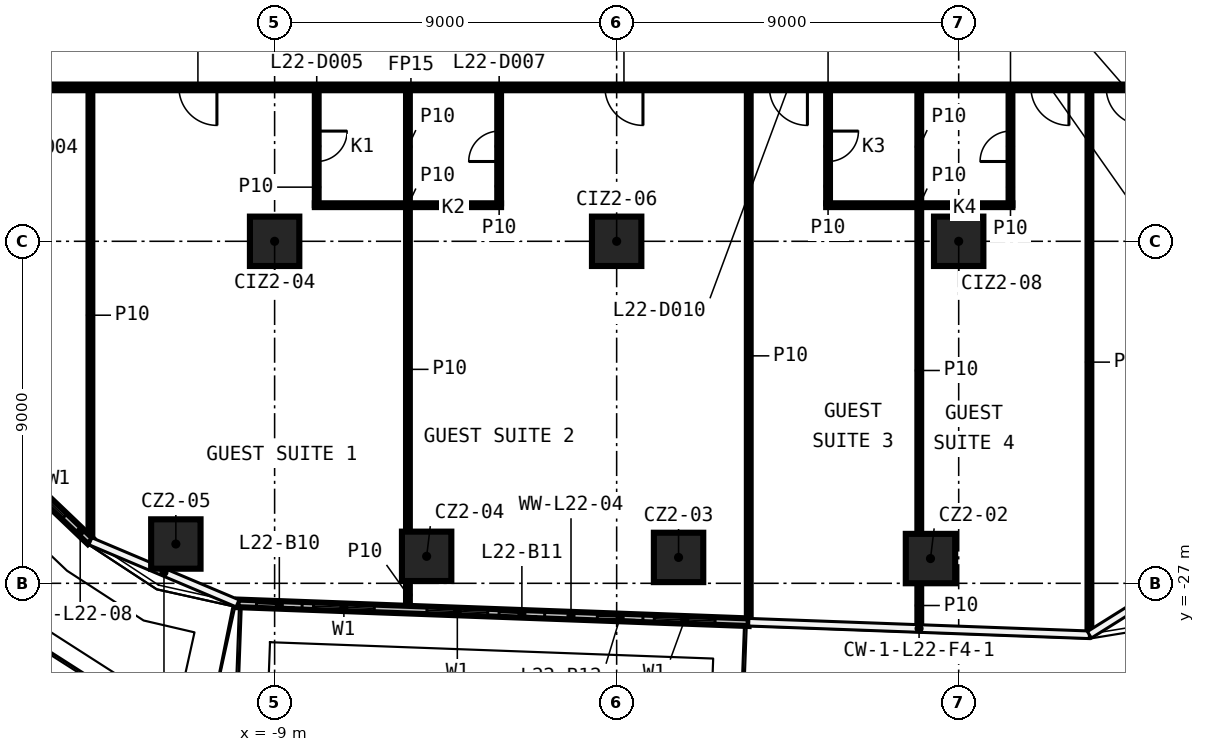
"""IFC4 building model, lengths in metres.
Left out: names, types, materials, properties, quantities, classifications, styles, units other than length and angle.
Written with IfcOpenShell. Run it as: python <this file> out.ifc"""

import sys

from ifc_helpers import new_model, si_unit, direction, frame, frame_2d, origin, origin_2d, place, context, subcontext, project, spatial, rectangle, extrude, element, fill, save


model = new_model("IFC4")
c1 = context("Model", 3, precision=1e-05, world=origin(), true_north=direction((0.0, 1.0)))
c2 = subcontext(c1, "Body", "Model", "MODEL_VIEW")
j1 = project(units=[si_unit("LENGTHUNIT", "METRE"), si_unit("PLANEANGLEUNIT", "RADIAN")], contexts=[c1])
p1 = place(None, origin())
s1 = spatial("IfcSite", under=j1, at=p1, CompositionType="ELEMENT")
p2 = place(p1, origin())
s2 = spatial("IfcBuilding", under=s1, at=p2, CompositionType="ELEMENT")
p3 = place(p2, frame((0.0, 0.0, 106.3)))
s3 = spatial("IfcBuildingStorey", under=s2, at=p3, CompositionType="ELEMENT", Elevation=106.3)
for number, where, z_axis, x_axis in (
    (1, (8.258, -26.349, 0.0), (0.0, 0.0, 1.0), (1.0, 0.0, 0.0)),
    (2, (1.629, -26.319, 0.0), (0.0, 0.0, 1.0), (1.0, 0.0, 0.0)),
    (3, (-5.0, -26.29, 0.0), (0.0, 0.0, 1.0), (1.0, 0.0, 0.0)),
    (4, (-11.599, -25.966, 0.0), (0.0, 0.0, 1.0), (1.0, 0.0, 0.0)),
    (5, (-9.0, -18.0, 0.0), (0.0, 0.0, 1.0), (1.0, 0.0, 0.0)),
    (6, (0.0, -18.0, 0.0), (0.0, 0.0, 1.0), (1.0, 0.0, 0.0)),
    (7, (9.0, -18.0, 0.0), (0.0, 0.0, 1.0), (1.0, 0.0, 0.0)),
):
    element("IfcColumn", number, at=place(p3, frame(where, z_axis=z_axis, x_axis=x_axis)), inside=s3, PredefinedType="COLUMN", context=c2, shape_type="SweptSolid", body=[
        extrude(rectangle(XDim=1.3, YDim=1.3, at=origin_2d()), origin(), (0.0, 0.0, 1.0), 3.3),
    ])
p4 = place(p3, frame((-7.942, -17.05, 0.0), z_axis=(0.0, 0.0, 1.0), x_axis=(1.0, 0.0, 0.0)))
e8 = element("IfcWall", 8, at=p4, inside=s3, PredefinedType="PARTITIONING", context=c2, shape_type="SweptSolid", body=[
    extrude(rectangle(XDim=4.9, YDim=0.1, at=frame_2d((2.45, 0.0))), origin(), (0.0, 0.0, 1.0), 3.3),
])
p5 = place(p3, frame((5.513, -17.05, 0.0), z_axis=(0.0, 0.0, 1.0), x_axis=(1.0, 0.0, 0.0)))
e9 = element("IfcWall", 9, at=p5, inside=s3, PredefinedType="PARTITIONING", context=c2, shape_type="SweptSolid", body=[
    extrude(rectangle(XDim=4.9, YDim=0.1, at=frame_2d((2.45, 0.0))), origin(), (0.0, 0.0, 1.0), 3.3),
])
p6 = place(p3, frame((17.025, -13.95, 0.0), z_axis=(0.0, 0.0, 1.0), x_axis=(-1.0, 0.0, 0.0)))
e10 = element("IfcWall", 10, at=p6, inside=s3, PredefinedType="PARTITIONING", context=c2, shape_type="SweptSolid", body=[
    extrude(rectangle(XDim=34.05, YDim=0.15, at=frame_2d((17.025, 0.0))), origin(), (0.0, 0.0, 1.0), 3.3),
])
p7 = place(p6, frame((31.974, 0.0, 0.0)))
e11 = element("IfcOpeningElement", 11, at=p7, cuts=e10, PredefinedType="OPENING", context=c2, shape_type="SweptSolid", body=[
    extrude(rectangle(XDim=0.9, YDim=2.1, at=frame_2d((0.45, 1.05))), frame((0.0, 0.085, 0.0), z_axis=(0.0, -1.0, 0.0), x_axis=(1.0, 0.0, 0.0)), (0.0, 0.0, 1.0), 0.17),
])
p8 = place(p6, frame((27.543, 0.0, 0.0)))
e12 = element("IfcOpeningElement", 12, at=p8, cuts=e10, PredefinedType="OPENING", context=c2, shape_type="SweptSolid", body=[
    extrude(rectangle(XDim=1.0, YDim=2.1, at=frame_2d((0.5, 1.05))), frame((0.0, 0.085, 0.0), z_axis=(0.0, -1.0, 0.0), x_axis=(1.0, 0.0, 0.0)), (0.0, 0.0, 1.0), 0.17),
])
p9 = place(p6, frame((16.333, 0.0, 0.0)))
e13 = element("IfcOpeningElement", 13, at=p9, cuts=e10, PredefinedType="OPENING", context=c2, shape_type="SweptSolid", body=[
    extrude(rectangle(XDim=1.0, YDim=2.1, at=frame_2d((0.5, 1.05))), frame((0.0, 0.085, 0.0), z_axis=(0.0, -1.0, 0.0), x_axis=(1.0, 0.0, 0.0)), (0.0, 0.0, 1.0), 0.17),
])
p10 = place(p6, frame((12.006, 0.0, 0.0)))
e14 = element("IfcOpeningElement", 14, at=p10, cuts=e10, PredefinedType="OPENING", context=c2, shape_type="SweptSolid", body=[
    extrude(rectangle(XDim=1.0, YDim=2.1, at=frame_2d((0.5, 1.05))), frame((0.0, 0.085, 0.0), z_axis=(0.0, -1.0, 0.0), x_axis=(1.0, 0.0, 0.0)), (0.0, 0.0, 1.0), 0.17),
])
p11 = place(p6, frame((5.124, 0.0, 0.0)))
e15 = element("IfcOpeningElement", 15, at=p11, cuts=e10, PredefinedType="OPENING", context=c2, shape_type="SweptSolid", body=[
    extrude(rectangle(XDim=1.0, YDim=2.1, at=frame_2d((0.5, 1.05))), frame((0.0, 0.085, 0.0), z_axis=(0.0, -1.0, 0.0), x_axis=(1.0, 0.0, 0.0)), (0.0, 0.0, 1.0), 0.17),
])
p12 = place(p6, frame((3.144, 0.0, 0.0)))
e16 = element("IfcOpeningElement", 16, at=p12, cuts=e10, PredefinedType="OPENING", context=c2, shape_type="SweptSolid", body=[
    extrude(rectangle(XDim=1.0, YDim=2.1, at=frame_2d((0.5, 1.05))), frame((0.0, 0.085, 0.0), z_axis=(0.0, -1.0, 0.0), x_axis=(1.0, 0.0, 0.0)), (0.0, 0.0, 1.0), 0.17),
])
p13 = place(p3, frame((12.44, -28.334, 0.0), z_axis=(0.0, 0.0, 1.0), x_axis=(0.0, 1.0, 0.0)))
e17 = element("IfcWall", 17, at=p13, inside=s3, PredefinedType="PARTITIONING", context=c2, shape_type="SweptSolid", body=[
    extrude(rectangle(XDim=14.31, YDim=0.1, at=frame_2d((7.155, 0.0))), origin(), (0.0, 0.0, 1.0), 3.3),
])
p14 = place(p3, frame((10.363, -17.05, 0.0), z_axis=(0.0, 0.0, 1.0), x_axis=(0.0, 1.0, 0.0)))
e18 = element("IfcWall", 18, at=p14, inside=s3, PredefinedType="PARTITIONING", context=c2, shape_type="SweptSolid", body=[
    extrude(rectangle(XDim=3.025, YDim=0.1, at=frame_2d((1.513, 0.0))), origin(), (0.0, 0.0, 1.0), 3.3),
])
p15 = place(p14, frame((1.15, 0.0, 0.0)))
e19 = element("IfcOpeningElement", 19, at=p15, cuts=e18, PredefinedType="OPENING", context=c2, shape_type="SweptSolid", body=[
    extrude(rectangle(XDim=0.8, YDim=2.1, at=frame_2d((0.4, 1.05))), frame((0.0, 0.06, 0.0), z_axis=(0.0, -1.0, 0.0), x_axis=(1.0, 0.0, 0.0)), (0.0, 0.0, 1.0), 0.12),
])
p16 = place(p3, frame((7.963, -28.17, 0.0), z_axis=(0.0, 0.0, 1.0), x_axis=(0.0, 1.0, 0.0)))
e20 = element("IfcWall", 20, at=p16, inside=s3, PredefinedType="PARTITIONING", context=c2, shape_type="SweptSolid", body=[
    extrude(rectangle(XDim=1.171, YDim=0.1, at=frame_2d((0.585, 0.0))), origin(), (0.0, 0.0, 1.0), 3.3),
])
p17 = place(p3, frame((7.963, -25.699, 0.0), z_axis=(0.0, 0.0, 1.0), x_axis=(0.0, 1.0, 0.0)))
e21 = element("IfcWall", 21, at=p17, inside=s3, PredefinedType="PARTITIONING", context=c2, shape_type="SweptSolid", body=[
    extrude(rectangle(XDim=8.599, YDim=0.1, at=frame_2d((4.299, 0.0))), origin(), (0.0, 0.0, 1.0), 3.3),
])
p18 = place(p3, frame((7.963, -17.0, 0.0), z_axis=(0.0, 0.0, 1.0), x_axis=(0.0, 1.0, 0.0)))
e22 = element("IfcWall", 22, at=p18, inside=s3, PredefinedType="PARTITIONING", context=c2, shape_type="SweptSolid", body=[
    extrude(rectangle(XDim=2.975, YDim=0.1, at=frame_2d((1.488, 0.0))), origin(), (0.0, 0.0, 1.0), 3.3),
])
p19 = place(p3, frame((5.563, -14.025, 0.0), z_axis=(0.0, 0.0, 1.0), x_axis=(0.0, -1.0, 0.0)))
e23 = element("IfcWall", 23, at=p19, inside=s3, PredefinedType="PARTITIONING", context=c2, shape_type="SweptSolid", body=[
    extrude(rectangle(XDim=2.975, YDim=0.1, at=frame_2d((1.488, 0.0))), origin(), (0.0, 0.0, 1.0), 3.3),
])
p20 = place(p19, frame((1.075, 0.0, 0.0)))
e24 = element("IfcOpeningElement", 24, at=p20, cuts=e23, PredefinedType="OPENING", context=c2, shape_type="SweptSolid", body=[
    extrude(rectangle(XDim=0.8, YDim=2.1, at=frame_2d((0.4, 1.05))), frame((0.0, 0.06, 0.0), z_axis=(0.0, -1.0, 0.0), x_axis=(1.0, 0.0, 0.0)), (0.0, 0.0, 1.0), 0.12),
])
p21 = place(p3, frame((3.476, -28.004, 0.0), z_axis=(0.0, 0.0, 1.0), x_axis=(0.0, 1.0, 0.0)))
e25 = element("IfcWall", 25, at=p21, inside=s3, PredefinedType="PARTITIONING", context=c2, shape_type="SweptSolid", body=[
    extrude(rectangle(XDim=13.979, YDim=0.1, at=frame_2d((6.99, 0.0))), origin(), (0.0, 0.0, 1.0), 3.3),
])
p22 = place(p3, frame((-3.092, -17.0, 0.0), z_axis=(0.0, 0.0, 1.0), x_axis=(0.0, 1.0, 0.0)))
e26 = element("IfcWall", 26, at=p22, inside=s3, PredefinedType="PARTITIONING", context=c2, shape_type="SweptSolid", body=[
    extrude(rectangle(XDim=2.975, YDim=0.1, at=frame_2d((1.488, 0.0))), origin(), (0.0, 0.0, 1.0), 3.3),
])
p23 = place(p22, frame((1.1, 0.0, 0.0)))
e27 = element("IfcOpeningElement", 27, at=p23, cuts=e26, PredefinedType="OPENING", context=c2, shape_type="SweptSolid", body=[
    extrude(rectangle(XDim=0.8, YDim=2.1, at=frame_2d((0.4, 1.05))), frame((0.0, 0.06, 0.0), z_axis=(0.0, -1.0, 0.0), x_axis=(1.0, 0.0, 0.0)), (0.0, 0.0, 1.0), 0.12),
])
p24 = place(p3, frame((-5.492, -27.673, 0.0), z_axis=(0.0, 0.0, 1.0), x_axis=(0.0, 1.0, 0.0)))
e28 = element("IfcWall", 28, at=p24, inside=s3, PredefinedType="PARTITIONING", context=c2, shape_type="SweptSolid", body=[
    extrude(rectangle(XDim=0.733, YDim=0.1, at=frame_2d((0.367, 0.0))), origin(), (0.0, 0.0, 1.0), 3.3),
])
p25 = place(p3, frame((-5.492, -25.64, 0.0), z_axis=(0.0, 0.0, 1.0), x_axis=(0.0, 1.0, 0.0)))
e29 = element("IfcWall", 29, at=p25, inside=s3, PredefinedType="PARTITIONING", context=c2, shape_type="SweptSolid", body=[
    extrude(rectangle(XDim=8.54, YDim=0.1, at=frame_2d((4.27, 0.0))), origin(), (0.0, 0.0, 1.0), 3.3),
])
p26 = place(p3, frame((-5.492, -17.0, 0.0), z_axis=(0.0, 0.0, 1.0), x_axis=(0.0, 1.0, 0.0)))
e30 = element("IfcWall", 30, at=p26, inside=s3, PredefinedType="PARTITIONING", context=c2, shape_type="SweptSolid", body=[
    extrude(rectangle(XDim=2.975, YDim=0.1, at=frame_2d((1.488, 0.0))), origin(), (0.0, 0.0, 1.0), 3.3),
])
p27 = place(p3, frame((-7.892, -14.025, 0.0), z_axis=(0.0, 0.0, 1.0), x_axis=(0.0, -1.0, 0.0)))
e31 = element("IfcWall", 31, at=p27, inside=s3, PredefinedType="PARTITIONING", context=c2, shape_type="SweptSolid", body=[
    extrude(rectangle(XDim=3.025, YDim=0.1, at=frame_2d((1.513, 0.0))), origin(), (0.0, 0.0, 1.0), 3.3),
])
p28 = place(p27, frame((1.075, 0.0, 0.0)))
e32 = element("IfcOpeningElement", 32, at=p28, cuts=e31, PredefinedType="OPENING", context=c2, shape_type="SweptSolid", body=[
    extrude(rectangle(XDim=0.8, YDim=2.1, at=frame_2d((0.4, 1.05))), frame((0.0, 0.06, 0.0), z_axis=(0.0, -1.0, 0.0), x_axis=(1.0, 0.0, 0.0)), (0.0, 0.0, 1.0), 0.12),
])
p29 = place(p3, frame((-13.847, -25.865, 0.0), z_axis=(0.0, 0.0, 1.0), x_axis=(0.0, 1.0, 0.0)))
e33 = element("IfcWall", 33, at=p29, inside=s3, PredefinedType="PARTITIONING", context=c2, shape_type="SweptSolid", body=[
    extrude(rectangle(XDim=11.84, YDim=0.1, at=frame_2d((5.92, 0.0))), origin(), (0.0, 0.0, 1.0), 3.3),
])
p30 = place(p3, frame((-17.133, -22.756, 0.0), z_axis=(0.0, 0.0, 1.0), x_axis=(0.723361644964, -0.69046935529, 0.0)))
e34 = element("IfcWall", 34, at=p30, inside=s3, PredefinedType="SOLIDWALL", context=c2, shape_type="SweptSolid", body=[
    extrude(rectangle(XDim=4.542, YDim=0.2, at=frame_2d((2.271, 0.0))), origin(), (0.0, 0.0, 1.0), 3.3),
])
p31 = place(p30, frame((2.0, 0.0, 0.6)))
e35 = element("IfcOpeningElement", 35, at=p31, cuts=e34, PredefinedType="OPENING", context=c2, shape_type="SweptSolid", body=[
    extrude(rectangle(XDim=1.6, YDim=2.4, at=frame_2d((0.8, 1.2))), frame((0.0, 0.11, 0.0), z_axis=(0.0, -1.0, 0.0), x_axis=(1.0, 0.0, 0.0)), (0.0, 0.0, 1.0), 0.22),
])
p32 = place(p30, frame((0.5, 0.0, 0.0)))
e36 = element("IfcOpeningElement", 36, at=p32, cuts=e34, PredefinedType="OPENING", context=c2, shape_type="SweptSolid", body=[
    extrude(rectangle(XDim=1.2, YDim=2.4, at=frame_2d((0.6, 1.2))), frame((0.0, 0.11, 0.0), z_axis=(0.0, -1.0, 0.0), x_axis=(1.0, 0.0, 0.0)), (0.0, 0.0, 1.0), 0.22),
])
p33 = place(p3, frame((-9.975, -27.528, 0.0), z_axis=(0.0, 0.0, 1.0), x_axis=(0.999319917794, -0.036874135924, 0.0)))
e37 = element("IfcWall", 37, at=p33, inside=s3, PredefinedType="SOLIDWALL", context=c2, shape_type="SweptSolid", body=[
    extrude(rectangle(XDim=13.46, YDim=0.2, at=frame_2d((6.73, 0.0))), origin(), (0.0, 0.0, 1.0), 3.3),
])
p34 = place(p33, frame((2.0, 0.0, 0.6)))
e38 = element("IfcOpeningElement", 38, at=p34, cuts=e37, PredefinedType="OPENING", context=c2, shape_type="SweptSolid", body=[
    extrude(rectangle(XDim=1.6, YDim=2.4, at=frame_2d((0.8, 1.2))), frame((0.0, 0.11, 0.0), z_axis=(0.0, -1.0, 0.0), x_axis=(1.0, 0.0, 0.0)), (0.0, 0.0, 1.0), 0.22),
])
p35 = place(p33, frame((0.5, 0.0, 0.0)))
e39 = element("IfcOpeningElement", 39, at=p35, cuts=e37, PredefinedType="OPENING", context=c2, shape_type="SweptSolid", body=[
    extrude(rectangle(XDim=1.2, YDim=2.4, at=frame_2d((0.6, 1.2))), frame((0.0, 0.11, 0.0), z_axis=(0.0, -1.0, 0.0), x_axis=(1.0, 0.0, 0.0)), (0.0, 0.0, 1.0), 0.22),
])
p36 = place(p33, frame((4.987, 0.0, 0.6)))
e40 = element("IfcOpeningElement", 40, at=p36, cuts=e37, PredefinedType="OPENING", context=c2, shape_type="SweptSolid", body=[
    extrude(rectangle(XDim=1.6, YDim=2.4, at=frame_2d((0.8, 1.2))), frame((0.0, 0.11, 0.0), z_axis=(0.0, -1.0, 0.0), x_axis=(1.0, 0.0, 0.0)), (0.0, 0.0, 1.0), 0.22),
])
p37 = place(p33, frame((6.887, 0.0, 0.0)))
e41 = element("IfcOpeningElement", 41, at=p37, cuts=e37, PredefinedType="OPENING", context=c2, shape_type="SweptSolid", body=[
    extrude(rectangle(XDim=1.2, YDim=2.4, at=frame_2d((0.6, 1.2))), frame((0.0, 0.11, 0.0), z_axis=(0.0, -1.0, 0.0), x_axis=(1.0, 0.0, 0.0)), (0.0, 0.0, 1.0), 0.22),
])
p38 = place(p33, frame((10.974, 0.0, 0.6)))
e42 = element("IfcOpeningElement", 42, at=p38, cuts=e37, PredefinedType="OPENING", context=c2, shape_type="SweptSolid", body=[
    extrude(rectangle(XDim=1.6, YDim=2.4, at=frame_2d((0.8, 1.2))), frame((0.0, 0.11, 0.0), z_axis=(0.0, -1.0, 0.0), x_axis=(1.0, 0.0, 0.0)), (0.0, 0.0, 1.0), 0.22),
])
p39 = place(p33, frame((9.474, 0.0, 0.0)))
e43 = element("IfcOpeningElement", 43, at=p39, cuts=e37, PredefinedType="OPENING", context=c2, shape_type="SweptSolid", body=[
    extrude(rectangle(XDim=1.2, YDim=2.4, at=frame_2d((0.6, 1.2))), frame((0.0, 0.11, 0.0), z_axis=(0.0, -1.0, 0.0), x_axis=(1.0, 0.0, 0.0)), (0.0, 0.0, 1.0), 0.22),
])
p40 = place(p28, origin())
e44 = element("IfcDoor", 44, at=p40, inside=s3, OperationType="SINGLE_SWING_RIGHT", PredefinedType="DOOR", context=c2, shape_type="SweptSolid", body=[
    extrude(rectangle(XDim=0.8, YDim=2.1, at=frame_2d((0.4, 1.05))), frame((0.0, 0.025, 0.0), z_axis=(0.0, -1.0, 0.0), x_axis=(1.0, 0.0, 0.0)), (0.0, 0.0, 1.0), 0.05),
])
fill(e32, e44)
p41 = place(p8, origin())
e45 = element("IfcDoor", 45, at=p41, inside=s3, OperationType="SINGLE_SWING_LEFT", PredefinedType="DOOR", context=c2, shape_type="SweptSolid", body=[
    extrude(rectangle(XDim=1.0, YDim=2.1, at=frame_2d((0.5, 1.05))), frame((0.0, 0.025, 0.0), z_axis=(0.0, -1.0, 0.0), x_axis=(1.0, 0.0, 0.0)), (0.0, 0.0, 1.0), 0.05),
])
fill(e12, e45)
p42 = place(p23, origin())
e46 = element("IfcDoor", 46, at=p42, inside=s3, OperationType="SINGLE_SWING_LEFT", PredefinedType="DOOR", context=c2, shape_type="SweptSolid", body=[
    extrude(rectangle(XDim=0.8, YDim=2.1, at=frame_2d((0.4, 1.05))), frame((0.0, 0.025, 0.0), z_axis=(0.0, -1.0, 0.0), x_axis=(1.0, 0.0, 0.0)), (0.0, 0.0, 1.0), 0.05),
])
fill(e27, e46)
p43 = place(p9, origin())
e47 = element("IfcDoor", 47, at=p43, inside=s3, OperationType="SINGLE_SWING_RIGHT", PredefinedType="DOOR", context=c2, shape_type="SweptSolid", body=[
    extrude(rectangle(XDim=1.0, YDim=2.1, at=frame_2d((0.5, 1.05))), frame((0.0, 0.025, 0.0), z_axis=(0.0, -1.0, 0.0), x_axis=(1.0, 0.0, 0.0)), (0.0, 0.0, 1.0), 0.05),
])
fill(e13, e47)
p44 = place(p20, origin())
e48 = element("IfcDoor", 48, at=p44, inside=s3, OperationType="SINGLE_SWING_RIGHT", PredefinedType="DOOR", context=c2, shape_type="SweptSolid", body=[
    extrude(rectangle(XDim=0.8, YDim=2.1, at=frame_2d((0.4, 1.05))), frame((0.0, 0.025, 0.0), z_axis=(0.0, -1.0, 0.0), x_axis=(1.0, 0.0, 0.0)), (0.0, 0.0, 1.0), 0.05),
])
fill(e24, e48)
p45 = place(p10, origin())
e49 = element("IfcDoor", 49, at=p45, inside=s3, OperationType="SINGLE_SWING_LEFT", PredefinedType="DOOR", context=c2, shape_type="SweptSolid", body=[
    extrude(rectangle(XDim=1.0, YDim=2.1, at=frame_2d((0.5, 1.05))), frame((0.0, 0.025, 0.0), z_axis=(0.0, -1.0, 0.0), x_axis=(1.0, 0.0, 0.0)), (0.0, 0.0, 1.0), 0.05),
])
fill(e14, e49)
p46 = place(p15, origin())
e50 = element("IfcDoor", 50, at=p46, inside=s3, OperationType="SINGLE_SWING_LEFT", PredefinedType="DOOR", context=c2, shape_type="SweptSolid", body=[
    extrude(rectangle(XDim=0.8, YDim=2.1, at=frame_2d((0.4, 1.05))), frame((0.0, 0.025, 0.0), z_axis=(0.0, -1.0, 0.0), x_axis=(1.0, 0.0, 0.0)), (0.0, 0.0, 1.0), 0.05),
])
fill(e19, e50)
p47 = place(p11, origin())
e51 = element("IfcDoor", 51, at=p47, inside=s3, OperationType="SINGLE_SWING_RIGHT", PredefinedType="DOOR", context=c2, shape_type="SweptSolid", body=[
    extrude(rectangle(XDim=1.0, YDim=2.1, at=frame_2d((0.5, 1.05))), frame((0.0, 0.025, 0.0), z_axis=(0.0, -1.0, 0.0), x_axis=(1.0, 0.0, 0.0)), (0.0, 0.0, 1.0), 0.05),
])
fill(e15, e51)
p48 = place(p12, origin())
e52 = element("IfcDoor", 52, at=p48, inside=s3, OperationType="SINGLE_SWING_LEFT", PredefinedType="DOOR", context=c2, shape_type="SweptSolid", body=[
    extrude(rectangle(XDim=1.0, YDim=2.1, at=frame_2d((0.5, 1.05))), frame((0.0, 0.025, 0.0), z_axis=(0.0, -1.0, 0.0), x_axis=(1.0, 0.0, 0.0)), (0.0, 0.0, 1.0), 0.05),
])
fill(e16, e52)
p49 = place(p31, origin())
e53 = element("IfcWindow", 53, at=p49, inside=s3, PartitioningType="SINGLE_PANEL", PredefinedType="WINDOW", context=c2, shape_type="SweptSolid", body=[
    extrude(rectangle(XDim=1.6, YDim=2.4, at=frame_2d((0.8, 1.2))), frame((0.0, 0.03, 0.0), z_axis=(0.0, -1.0, 0.0), x_axis=(1.0, 0.0, 0.0)), (0.0, 0.0, 1.0), 0.06),
])
fill(e35, e53)
p50 = place(p34, origin())
e54 = element("IfcWindow", 54, at=p50, inside=s3, PartitioningType="SINGLE_PANEL", PredefinedType="WINDOW", context=c2, shape_type="SweptSolid", body=[
    extrude(rectangle(XDim=1.6, YDim=2.4, at=frame_2d((0.8, 1.2))), frame((0.0, 0.03, 0.0), z_axis=(0.0, -1.0, 0.0), x_axis=(1.0, 0.0, 0.0)), (0.0, 0.0, 1.0), 0.06),
])
fill(e38, e54)
p51 = place(p35, origin())
e55 = element("IfcDoor", 55, at=p51, inside=s3, OperationType="SLIDING_TO_LEFT", PredefinedType="DOOR", context=c2, shape_type="SweptSolid", body=[
    extrude(rectangle(XDim=1.2, YDim=2.4, at=frame_2d((0.6, 1.2))), frame((0.0, 0.025, 0.0), z_axis=(0.0, -1.0, 0.0), x_axis=(1.0, 0.0, 0.0)), (0.0, 0.0, 1.0), 0.05),
])
fill(e39, e55)
p52 = place(p36, origin())
e56 = element("IfcWindow", 56, at=p52, inside=s3, PartitioningType="SINGLE_PANEL", PredefinedType="WINDOW", context=c2, shape_type="SweptSolid", body=[
    extrude(rectangle(XDim=1.6, YDim=2.4, at=frame_2d((0.8, 1.2))), frame((0.0, 0.03, 0.0), z_axis=(0.0, -1.0, 0.0), x_axis=(1.0, 0.0, 0.0)), (0.0, 0.0, 1.0), 0.06),
])
fill(e40, e56)
p53 = place(p37, origin())
e57 = element("IfcDoor", 57, at=p53, inside=s3, OperationType="SLIDING_TO_LEFT", PredefinedType="DOOR", context=c2, shape_type="SweptSolid", body=[
    extrude(rectangle(XDim=1.2, YDim=2.4, at=frame_2d((0.6, 1.2))), frame((0.0, 0.025, 0.0), z_axis=(0.0, -1.0, 0.0), x_axis=(1.0, 0.0, 0.0)), (0.0, 0.0, 1.0), 0.05),
])
fill(e41, e57)
p54 = place(p38, origin())
e58 = element("IfcWindow", 58, at=p54, inside=s3, PartitioningType="SINGLE_PANEL", PredefinedType="WINDOW", context=c2, shape_type="SweptSolid", body=[
    extrude(rectangle(XDim=1.6, YDim=2.4, at=frame_2d((0.8, 1.2))), frame((0.0, 0.03, 0.0), z_axis=(0.0, -1.0, 0.0), x_axis=(1.0, 0.0, 0.0)), (0.0, 0.0, 1.0), 0.06),
])
fill(e42, e58)
p55 = place(p39, origin())
e59 = element("IfcDoor", 59, at=p55, inside=s3, OperationType="SLIDING_TO_LEFT", PredefinedType="DOOR", context=c2, shape_type="SweptSolid", body=[
    extrude(rectangle(XDim=1.2, YDim=2.4, at=frame_2d((0.6, 1.2))), frame((0.0, 0.025, 0.0), z_axis=(0.0, -1.0, 0.0), x_axis=(1.0, 0.0, 0.0)), (0.0, 0.0, 1.0), 0.05),
])
fill(e43, e59)
save(model, sys.argv[1])
